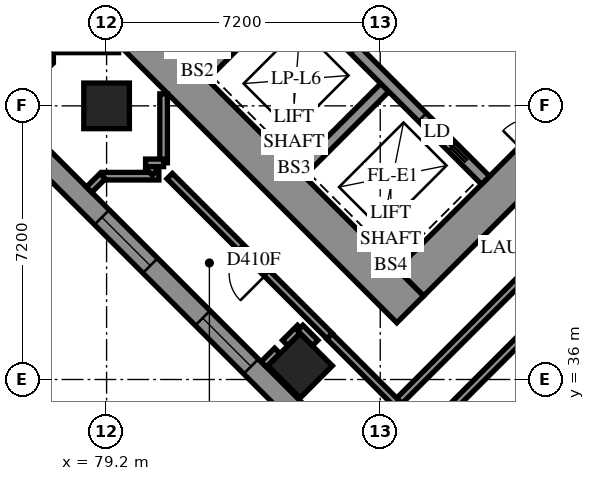
"""IFC4 building model, lengths in metres.
Left out: names, types, materials, properties, quantities, classifications, styles, units other than length and angle.
Written with IfcOpenShell. Run it as: python <this file> out.ifc"""

import sys

from ifc_helpers import new_model, si_unit, direction, frame, frame_2d, origin, origin_2d, place, context, subcontext, project, spatial, polyline, rectangle, outline, extrude, element, fill, save


model = new_model("IFC4")
c1 = context("Model", 3, precision=1e-05, world=origin(), true_north=direction((0.0, 1.0)))
c2 = subcontext(c1, "Body", "Model", "MODEL_VIEW")
j1 = project(units=[si_unit("LENGTHUNIT", "METRE"), si_unit("PLANEANGLEUNIT", "RADIAN")], contexts=[c1])
p1 = place(None, origin())
s1 = spatial("IfcSite", under=j1, at=p1, CompositionType="ELEMENT")
p2 = place(p1, origin())
s2 = spatial("IfcBuilding", under=s1, at=p2, CompositionType="ELEMENT")
p3 = place(p2, frame((0.0, 0.0, 18.6)))
s3 = spatial("IfcBuildingStorey", under=s2, at=p3, CompositionType="ELEMENT", Elevation=18.6)
for number, where, z_axis, x_axis in (
    (1, (79.2, 43.2, 0.0), (0.0, 0.0, 1.0), (1.0, 0.0, 0.0)),
    (2, (84.291, 36.362, 0.0), (0.0, 0.0, 1.0), (0.707, -0.707, 0.0)),
):
    element("IfcColumn", number, at=place(p3, frame(where, z_axis=z_axis, x_axis=x_axis)), inside=s3, PredefinedType="COLUMN", context=c2, shape_type="SweptSolid", body=[
        extrude(rectangle(XDim=1.2, YDim=1.2, at=origin_2d()), origin(), (0.0, 0.0, 1.0), 3.8),
    ])
p4 = place(p3, frame((75.594, 49.443, -0.4), z_axis=(0.0, 0.0, 1.0), x_axis=(0.7071037324, -0.70710983, 0.0)))
e3 = element("IfcWall", 3, at=p4, inside=s3, PredefinedType="SHEAR", context=c2, shape_type="SweptSolid", body=[
    extrude(rectangle(XDim=16.4, YDim=1.0, at=frame_2d((8.2, 0.0))), origin(), (0.0, 0.0, 1.0), 3.5),
])
p5 = place(p3, frame((87.19, 38.554, -0.4), z_axis=(0.0, 0.0, 1.0), x_axis=(0.707103309, 0.7071102534, 0.0)))
e4 = element("IfcWall", 4, at=p5, inside=s3, PredefinedType="SHEAR", context=c2, shape_type="SweptSolid", body=[
    extrude(rectangle(XDim=14.4, YDim=1.0, at=frame_2d((7.2, 0.0))), origin(), (0.0, 0.0, 1.0), 3.5),
])
p6 = place(p5, frame((4.55, 0.0, 0.4)))
e5 = element("IfcOpeningElement", 5, at=p6, cuts=e4, PredefinedType="OPENING", context=c2, shape_type="SweptSolid", body=[
    extrude(rectangle(XDim=1.1, YDim=2.1, at=frame_2d((0.55, 1.05))), frame((0.0, 0.51, 0.0), z_axis=(0.0, -1.0, 0.0), x_axis=(1.0, 0.0, 0.0)), (0.0, 0.0, 1.0), 1.02),
])
p7 = place(p5, frame((11.35, 0.0, 0.4)))
e6 = element("IfcOpeningElement", 6, at=p7, cuts=e4, PredefinedType="OPENING", context=c2, shape_type="SweptSolid", body=[
    extrude(rectangle(XDim=1.1, YDim=2.1, at=frame_2d((0.55, 1.05))), frame((0.0, 0.51, 0.0), z_axis=(0.0, -1.0, 0.0), x_axis=(1.0, 0.0, 0.0)), (0.0, 0.0, 1.0), 1.02),
])
for number, where, z_axis, x_axis in (
    (7, (81.746, 43.999, 0.0), (0.0, 0.0, 1.0), (0.707, 0.707, 0.0)),
    (8, (84.291, 41.453, 0.0), (0.0, 0.0, 1.0), (0.707, 0.707, 0.0)),
):
    element("IfcWall", number, at=place(p3, frame(where, z_axis=z_axis, x_axis=x_axis)), inside=s3, PredefinedType="SOLIDWALL", context=c2, shape_type="SweptSolid", body=[
        extrude(rectangle(XDim=3.3, YDim=0.3, at=frame_2d((1.65, 0.0))), origin(), (0.0, 0.0, 1.0), 3.8),
    ])
p8 = place(p3, frame((78.988, 51.423, 0.0), z_axis=(0.0, 0.0, 1.0), x_axis=(0.7071067812, -0.7071067812, 0.0)))
e9 = element("IfcWall", 9, at=p8, inside=s3, PredefinedType="SOLIDWALL", context=c2, shape_type="SweptSolid", body=[
    extrude(rectangle(XDim=14.4, YDim=0.3, at=frame_2d((7.2, 0.0))), origin(), (0.0, 0.0, 1.0), 3.8),
])
p9 = place(p8, frame((1.25, 0.0, 0.0)))
e10 = element("IfcOpeningElement", 10, at=p9, cuts=e9, PredefinedType="OPENING", context=c2, shape_type="SweptSolid", body=[
    extrude(rectangle(XDim=1.1, YDim=2.1, at=frame_2d((0.55, 1.05))), frame((0.0, 0.16, 0.0), z_axis=(0.0, -1.0, 0.0), x_axis=(1.0, 0.0, 0.0)), (0.0, 0.0, 1.0), 0.32),
])
p10 = place(p8, frame((4.85, 0.0, 0.0)))
e11 = element("IfcOpeningElement", 11, at=p10, cuts=e9, PredefinedType="OPENING", context=c2, shape_type="SweptSolid", body=[
    extrude(rectangle(XDim=1.1, YDim=2.1, at=frame_2d((0.55, 1.05))), frame((0.0, 0.16, 0.0), z_axis=(0.0, -1.0, 0.0), x_axis=(1.0, 0.0, 0.0)), (0.0, 0.0, 1.0), 0.32),
])
p11 = place(p8, frame((8.45, 0.0, 0.0)))
e12 = element("IfcOpeningElement", 12, at=p11, cuts=e9, PredefinedType="OPENING", context=c2, shape_type="SweptSolid", body=[
    extrude(rectangle(XDim=1.1, YDim=2.1, at=frame_2d((0.55, 1.05))), frame((0.0, 0.16, 0.0), z_axis=(0.0, -1.0, 0.0), x_axis=(1.0, 0.0, 0.0)), (0.0, 0.0, 1.0), 0.32),
])
p12 = place(p8, frame((12.05, 0.0, 0.0)))
e13 = element("IfcOpeningElement", 13, at=p12, cuts=e9, PredefinedType="OPENING", context=c2, shape_type="SweptSolid", body=[
    extrude(rectangle(XDim=1.1, YDim=2.1, at=frame_2d((0.55, 1.05))), frame((0.0, 0.16, 0.0), z_axis=(0.0, -1.0, 0.0), x_axis=(1.0, 0.0, 0.0)), (0.0, 0.0, 1.0), 0.32),
])
p13 = place(p3, frame((81.534, 53.969, 0.0), z_axis=(0.0, 0.0, 1.0), x_axis=(0.707103309, -0.7071102534, 0.0)))
e14 = element("IfcWall", 14, at=p13, inside=s3, PredefinedType="SOLIDWALL", context=c2, shape_type="SweptSolid", body=[
    extrude(rectangle(XDim=14.4, YDim=0.3, at=frame_2d((7.2, 0.0))), origin(), (0.0, 0.0, 1.0), 3.8),
])
p14 = place(p13, frame((12.05, 0.0, 0.0)))
e15 = element("IfcOpeningElement", 15, at=p14, cuts=e14, PredefinedType="OPENING", context=c2, shape_type="SweptSolid", body=[
    extrude(rectangle(XDim=1.1, YDim=2.1, at=frame_2d((0.55, 1.05))), frame((0.0, 0.16, 0.0), z_axis=(0.0, -1.0, 0.0), x_axis=(1.0, 0.0, 0.0)), (0.0, 0.0, 1.0), 0.32),
])
p15 = place(p3, frame((117.843, 34.665, 0.0), z_axis=(0.0, 0.0, 1.0), x_axis=(-0.7071067812, 0.7071067812, 0.0)))
e16 = element("IfcWall", 16, at=p15, inside=s3, PredefinedType="SOLIDWALL", context=c2, shape_type="SweptSolid", body=[
    extrude(outline(polyline([(-0.275, -0.275), (54.222, -0.275), (53.994, 0.275), (0.275, 0.275), (-0.275, -0.275)])), origin(), (0.0, 0.0, 1.0), 3.8),
])
p16 = place(p15, frame((0.8, 0.0, 0.7)))
e17 = element("IfcOpeningElement", 17, at=p16, cuts=e16, PredefinedType="OPENING", context=c2, shape_type="SweptSolid", body=[
    extrude(rectangle(XDim=1.8, YDim=2.4, at=frame_2d((0.9, 1.2))), frame((0.0, 0.285, 0.0), z_axis=(0.0, -1.0, 0.0), x_axis=(1.0, 0.0, 0.0)), (0.0, 0.0, 1.0), 0.57),
])
p17 = place(p15, frame((4.225, 0.0, 0.7)))
e18 = element("IfcOpeningElement", 18, at=p17, cuts=e16, PredefinedType="OPENING", context=c2, shape_type="SweptSolid", body=[
    extrude(rectangle(XDim=1.8, YDim=2.4, at=frame_2d((0.9, 1.2))), frame((0.0, 0.285, 0.0), z_axis=(0.0, -1.0, 0.0), x_axis=(1.0, 0.0, 0.0)), (0.0, 0.0, 1.0), 0.57),
])
p18 = place(p15, frame((7.825, 0.0, 0.7)))
e19 = element("IfcOpeningElement", 19, at=p18, cuts=e16, PredefinedType="OPENING", context=c2, shape_type="SweptSolid", body=[
    extrude(rectangle(XDim=1.8, YDim=2.4, at=frame_2d((0.9, 1.2))), frame((0.0, 0.285, 0.0), z_axis=(0.0, -1.0, 0.0), x_axis=(1.0, 0.0, 0.0)), (0.0, 0.0, 1.0), 0.57),
])
p19 = place(p15, frame((11.425, 0.0, 0.7)))
e20 = element("IfcOpeningElement", 20, at=p19, cuts=e16, PredefinedType="OPENING", context=c2, shape_type="SweptSolid", body=[
    extrude(rectangle(XDim=1.8, YDim=2.4, at=frame_2d((0.9, 1.2))), frame((0.0, 0.285, 0.0), z_axis=(0.0, -1.0, 0.0), x_axis=(1.0, 0.0, 0.0)), (0.0, 0.0, 1.0), 0.57),
])
p20 = place(p15, frame((15.025, 0.0, 0.7)))
e21 = element("IfcOpeningElement", 21, at=p20, cuts=e16, PredefinedType="OPENING", context=c2, shape_type="SweptSolid", body=[
    extrude(rectangle(XDim=1.8, YDim=2.4, at=frame_2d((0.9, 1.2))), frame((0.0, 0.285, 0.0), z_axis=(0.0, -1.0, 0.0), x_axis=(1.0, 0.0, 0.0)), (0.0, 0.0, 1.0), 0.57),
])
p21 = place(p15, frame((18.625, 0.0, 0.7)))
e22 = element("IfcOpeningElement", 22, at=p21, cuts=e16, PredefinedType="OPENING", context=c2, shape_type="SweptSolid", body=[
    extrude(rectangle(XDim=1.8, YDim=2.4, at=frame_2d((0.9, 1.2))), frame((0.0, 0.285, 0.0), z_axis=(0.0, -1.0, 0.0), x_axis=(1.0, 0.0, 0.0)), (0.0, 0.0, 1.0), 0.57),
])
p22 = place(p15, frame((22.225, 0.0, 0.7)))
e23 = element("IfcOpeningElement", 23, at=p22, cuts=e16, PredefinedType="OPENING", context=c2, shape_type="SweptSolid", body=[
    extrude(rectangle(XDim=1.8, YDim=2.4, at=frame_2d((0.9, 1.2))), frame((0.0, 0.285, 0.0), z_axis=(0.0, -1.0, 0.0), x_axis=(1.0, 0.0, 0.0)), (0.0, 0.0, 1.0), 0.57),
])
p23 = place(p15, frame((25.825, 0.0, 0.7)))
e24 = element("IfcOpeningElement", 24, at=p23, cuts=e16, PredefinedType="OPENING", context=c2, shape_type="SweptSolid", body=[
    extrude(rectangle(XDim=1.8, YDim=2.4, at=frame_2d((0.9, 1.2))), frame((0.0, 0.285, 0.0), z_axis=(0.0, -1.0, 0.0), x_axis=(1.0, 0.0, 0.0)), (0.0, 0.0, 1.0), 0.57),
])
p24 = place(p15, frame((29.425, 0.0, 0.7)))
e25 = element("IfcOpeningElement", 25, at=p24, cuts=e16, PredefinedType="OPENING", context=c2, shape_type="SweptSolid", body=[
    extrude(rectangle(XDim=1.8, YDim=2.4, at=frame_2d((0.9, 1.2))), frame((0.0, 0.285, 0.0), z_axis=(0.0, -1.0, 0.0), x_axis=(1.0, 0.0, 0.0)), (0.0, 0.0, 1.0), 0.57),
])
p25 = place(p15, frame((33.025, 0.0, 0.7)))
e26 = element("IfcOpeningElement", 26, at=p25, cuts=e16, PredefinedType="OPENING", context=c2, shape_type="SweptSolid", body=[
    extrude(rectangle(XDim=1.8, YDim=2.4, at=frame_2d((0.9, 1.2))), frame((0.0, 0.285, 0.0), z_axis=(0.0, -1.0, 0.0), x_axis=(1.0, 0.0, 0.0)), (0.0, 0.0, 1.0), 0.57),
])
p26 = place(p15, frame((36.625, 0.0, 0.7)))
e27 = element("IfcOpeningElement", 27, at=p26, cuts=e16, PredefinedType="OPENING", context=c2, shape_type="SweptSolid", body=[
    extrude(rectangle(XDim=1.8, YDim=2.4, at=frame_2d((0.9, 1.2))), frame((0.0, 0.285, 0.0), z_axis=(0.0, -1.0, 0.0), x_axis=(1.0, 0.0, 0.0)), (0.0, 0.0, 1.0), 0.57),
])
p27 = place(p15, frame((40.225, 0.0, 0.7)))
e28 = element("IfcOpeningElement", 28, at=p27, cuts=e16, PredefinedType="OPENING", context=c2, shape_type="SweptSolid", body=[
    extrude(rectangle(XDim=1.8, YDim=2.4, at=frame_2d((0.9, 1.2))), frame((0.0, 0.285, 0.0), z_axis=(0.0, -1.0, 0.0), x_axis=(1.0, 0.0, 0.0)), (0.0, 0.0, 1.0), 0.57),
])
p28 = place(p15, frame((43.825, 0.0, 0.7)))
e29 = element("IfcOpeningElement", 29, at=p28, cuts=e16, PredefinedType="OPENING", context=c2, shape_type="SweptSolid", body=[
    extrude(rectangle(XDim=1.8, YDim=2.4, at=frame_2d((0.9, 1.2))), frame((0.0, 0.285, 0.0), z_axis=(0.0, -1.0, 0.0), x_axis=(1.0, 0.0, 0.0)), (0.0, 0.0, 1.0), 0.57),
])
p29 = place(p15, frame((47.425, 0.0, 0.7)))
e30 = element("IfcOpeningElement", 30, at=p29, cuts=e16, PredefinedType="OPENING", context=c2, shape_type="SweptSolid", body=[
    extrude(rectangle(XDim=1.8, YDim=2.4, at=frame_2d((0.9, 1.2))), frame((0.0, 0.285, 0.0), z_axis=(0.0, -1.0, 0.0), x_axis=(1.0, 0.0, 0.0)), (0.0, 0.0, 1.0), 0.57),
])
p30 = place(p15, frame((51.06, 0.0, 0.7)))
e31 = element("IfcOpeningElement", 31, at=p30, cuts=e16, PredefinedType="OPENING", context=c2, shape_type="SweptSolid", body=[
    extrude(rectangle(XDim=1.8, YDim=2.4, at=frame_2d((0.9, 1.2))), frame((0.0, 0.285, 0.0), z_axis=(0.0, -1.0, 0.0), x_axis=(1.0, 0.0, 0.0)), (0.0, 0.0, 1.0), 0.57),
])
p31 = place(p3, frame((77.07, 42.275, 0.0), z_axis=(0.0, 0.0, 1.0), x_axis=(0.7071067812, -0.7071067812, 0.0)))
e32 = element("IfcWall", 32, at=p31, inside=s3, PredefinedType="SOLIDWALL", context=c2, shape_type="SweptSolid", body=[
    extrude(outline(polyline([(0.114, -0.275), (39.288, -0.275), (38.737, 0.275), (-0.114, 0.275), (0.114, -0.275)])), origin(), (0.0, 0.0, 1.0), 3.8),
])
p32 = place(p31, frame((2.837, 0.0, 0.7)))
e33 = element("IfcOpeningElement", 33, at=p32, cuts=e32, PredefinedType="OPENING", context=c2, shape_type="SweptSolid", body=[
    extrude(rectangle(XDim=1.8, YDim=2.4, at=frame_2d((0.9, 1.2))), frame((0.0, 0.285, 0.0), z_axis=(0.0, -1.0, 0.0), x_axis=(1.0, 0.0, 0.0)), (0.0, 0.0, 1.0), 0.57),
])
p33 = place(p31, frame((6.588, 0.0, 0.7)))
e34 = element("IfcOpeningElement", 34, at=p33, cuts=e32, PredefinedType="OPENING", context=c2, shape_type="SweptSolid", body=[
    extrude(rectangle(XDim=1.8, YDim=2.4, at=frame_2d((0.9, 1.2))), frame((0.0, 0.285, 0.0), z_axis=(0.0, -1.0, 0.0), x_axis=(1.0, 0.0, 0.0)), (0.0, 0.0, 1.0), 0.57),
])
p34 = place(p31, frame((10.188, 0.0, 0.7)))
e35 = element("IfcOpeningElement", 35, at=p34, cuts=e32, PredefinedType="OPENING", context=c2, shape_type="SweptSolid", body=[
    extrude(rectangle(XDim=1.8, YDim=2.4, at=frame_2d((0.9, 1.2))), frame((0.0, 0.285, 0.0), z_axis=(0.0, -1.0, 0.0), x_axis=(1.0, 0.0, 0.0)), (0.0, 0.0, 1.0), 0.57),
])
p35 = place(p31, frame((13.787, 0.0, 0.7)))
e36 = element("IfcOpeningElement", 36, at=p35, cuts=e32, PredefinedType="OPENING", context=c2, shape_type="SweptSolid", body=[
    extrude(rectangle(XDim=1.8, YDim=2.4, at=frame_2d((0.9, 1.2))), frame((0.0, 0.285, 0.0), z_axis=(0.0, -1.0, 0.0), x_axis=(1.0, 0.0, 0.0)), (0.0, 0.0, 1.0), 0.57),
])
p36 = place(p31, frame((17.387, 0.0, 0.7)))
e37 = element("IfcOpeningElement", 37, at=p36, cuts=e32, PredefinedType="OPENING", context=c2, shape_type="SweptSolid", body=[
    extrude(rectangle(XDim=1.8, YDim=2.4, at=frame_2d((0.9, 1.2))), frame((0.0, 0.285, 0.0), z_axis=(0.0, -1.0, 0.0), x_axis=(1.0, 0.0, 0.0)), (0.0, 0.0, 1.0), 0.57),
])
p37 = place(p31, frame((20.988, 0.0, 0.7)))
e38 = element("IfcOpeningElement", 38, at=p37, cuts=e32, PredefinedType="OPENING", context=c2, shape_type="SweptSolid", body=[
    extrude(rectangle(XDim=1.8, YDim=2.4, at=frame_2d((0.9, 1.2))), frame((0.0, 0.285, 0.0), z_axis=(0.0, -1.0, 0.0), x_axis=(1.0, 0.0, 0.0)), (0.0, 0.0, 1.0), 0.57),
])
p38 = place(p31, frame((24.587, 0.0, 0.7)))
e39 = element("IfcOpeningElement", 39, at=p38, cuts=e32, PredefinedType="OPENING", context=c2, shape_type="SweptSolid", body=[
    extrude(rectangle(XDim=1.8, YDim=2.4, at=frame_2d((0.9, 1.2))), frame((0.0, 0.285, 0.0), z_axis=(0.0, -1.0, 0.0), x_axis=(1.0, 0.0, 0.0)), (0.0, 0.0, 1.0), 0.57),
])
p39 = place(p31, frame((28.188, 0.0, 0.7)))
e40 = element("IfcOpeningElement", 40, at=p39, cuts=e32, PredefinedType="OPENING", context=c2, shape_type="SweptSolid", body=[
    extrude(rectangle(XDim=1.8, YDim=2.4, at=frame_2d((0.9, 1.2))), frame((0.0, 0.285, 0.0), z_axis=(0.0, -1.0, 0.0), x_axis=(1.0, 0.0, 0.0)), (0.0, 0.0, 1.0), 0.57),
])
p40 = place(p31, frame((31.788, 0.0, 0.7)))
e41 = element("IfcOpeningElement", 41, at=p40, cuts=e32, PredefinedType="OPENING", context=c2, shape_type="SweptSolid", body=[
    extrude(rectangle(XDim=1.8, YDim=2.4, at=frame_2d((0.9, 1.2))), frame((0.0, 0.285, 0.0), z_axis=(0.0, -1.0, 0.0), x_axis=(1.0, 0.0, 0.0)), (0.0, 0.0, 1.0), 0.57),
])
p41 = place(p31, frame((35.388, 0.0, 0.7)))
e42 = element("IfcOpeningElement", 42, at=p41, cuts=e32, PredefinedType="OPENING", context=c2, shape_type="SweptSolid", body=[
    extrude(rectangle(XDim=1.8, YDim=2.4, at=frame_2d((0.9, 1.2))), frame((0.0, 0.285, 0.0), z_axis=(0.0, -1.0, 0.0), x_axis=(1.0, 0.0, 0.0)), (0.0, 0.0, 1.0), 0.57),
])
p42 = place(p3, frame((86.376, 33.357, 0.0), z_axis=(0.0, 0.0, 1.0), x_axis=(0.7071021083, 0.707111454, 0.0)))
e43 = element("IfcWall", 43, at=p42, inside=s3, PredefinedType="PARTITIONING", context=c2, shape_type="SweptSolid", body=[
    extrude(rectangle(XDim=10.7, YDim=0.2, at=frame_2d((5.35, 0.0))), origin(), (0.0, 0.0, 1.0), 3.8),
])
p43 = place(p3, frame((86.836, 35.372, 0.0), z_axis=(0.0, 0.0, 1.0), x_axis=(0.7071067812, 0.7071067812, 0.0)))
e44 = element("IfcWall", 44, at=p43, inside=s3, PredefinedType="PARTITIONING", context=c2, shape_type="SweptSolid", body=[
    extrude(rectangle(XDim=8.949, YDim=0.2, at=frame_2d((4.474, 0.0))), origin(), (0.0, 0.0, 1.0), 3.8),
])
p44 = place(p43, frame((7.8, 0.0, 0.0)))
e45 = element("IfcOpeningElement", 45, at=p44, cuts=e44, PredefinedType="OPENING", context=c2, shape_type="SweptSolid", body=[
    extrude(rectangle(XDim=1.0, YDim=2.1, at=frame_2d((0.5, 1.05))), frame((0.0, 0.11, 0.0), z_axis=(0.0, -1.0, 0.0), x_axis=(1.0, 0.0, 0.0)), (0.0, 0.0, 1.0), 0.22),
])
p45 = place(p3, frame((85.07, 37.142, 0.0), z_axis=(0.0, 0.0, 1.0), x_axis=(-0.7070899851, 0.7071235769, 0.0)))
e46 = element("IfcWall", 46, at=p45, inside=s3, PredefinedType="PARTITIONING", context=c2, shape_type="SweptSolid", body=[
    extrude(rectangle(XDim=5.954, YDim=0.2, at=frame_2d((2.977, 0.0))), origin(), (0.0, 0.0, 1.0), 3.8),
])
p46 = place(p45, frame((2.326, 0.0, 0.0)))
e47 = element("IfcOpeningElement", 47, at=p46, cuts=e46, PredefinedType="OPENING", context=c2, shape_type="SweptSolid", body=[
    extrude(rectangle(XDim=1.0, YDim=2.1, at=frame_2d((0.5, 1.05))), frame((0.0, 0.11, 0.0), z_axis=(0.0, -1.0, 0.0), x_axis=(1.0, 0.0, 0.0)), (0.0, 0.0, 1.0), 0.22),
])
p47 = place(p3, frame((85.065, 37.137, 0.0), z_axis=(0.0, 0.0, 1.0), x_axis=(0.7071067812, -0.7071067812, 0.0)))
e48 = element("IfcWall", 48, at=p47, inside=s3, PredefinedType="PARTITIONING", context=c2, shape_type="SweptSolid", body=[
    extrude(rectangle(XDim=2.5, YDim=0.2, at=frame_2d((1.25, 0.0))), origin(), (0.0, 0.0, 1.0), 3.8),
])
for number, where, z_axis, x_axis in (
    (49, (77.702, 44.7, 0.0), (0.0, 0.0, 1.0), (1.0, 0.0, 0.0)),
    (50, (80.7, 41.702, 0.0), (0.0, 0.0, 1.0), (0.0, 1.0, 0.0)),
):
    element("IfcWall", number, at=place(p3, frame(where, z_axis=z_axis, x_axis=x_axis)), inside=s3, PredefinedType="PARTITIONING", context=c2, shape_type="SweptSolid", body=[
        extrude(rectangle(XDim=1.814, YDim=0.2, at=frame_2d((0.907, 0.0))), origin(), (0.0, 0.0, 1.0), 3.8),
    ])
p48 = place(p3, frame((79.098, 41.35, 0.0), z_axis=(0.0, 0.0, 1.0), x_axis=(1.0, 0.0, 0.0)))
e51 = element("IfcWall", 51, at=p48, inside=s3, PredefinedType="PARTITIONING", context=c2, shape_type="SweptSolid", body=[
    extrude(rectangle(XDim=1.478, YDim=0.2, at=frame_2d((0.739, 0.0))), origin(), (0.0, 0.0, 1.0), 3.8),
])
for number, where, z_axis, x_axis in (
    (52, (83.9, 36.962, 0.0), (0.0, 0.0, 1.0), (0.707, 0.707, 0.0)),
    (53, (84.294, 37.356, 0.0), (0.0, 0.0, 1.0), (0.707, -0.707, 0.0)),
):
    element("IfcWall", number, at=place(p3, frame(where, z_axis=z_axis, x_axis=x_axis)), inside=s3, PredefinedType="PARTITIONING", context=c2, shape_type="SweptSolid", body=[
        extrude(rectangle(XDim=0.557, YDim=0.2, at=frame_2d((0.279, 0.0))), origin(), (0.0, 0.0, 1.0), 3.8),
    ])
p49 = place(p3, frame((80.315, 41.605, 0.0), z_axis=(0.0, 0.0, 1.0), x_axis=(0.7071067812, -0.7071067812, 0.0)))
e54 = element("IfcWall", 54, at=p49, inside=s3, PredefinedType="PARTITIONING", context=c2, shape_type="SweptSolid", body=[
    extrude(rectangle(XDim=0.225, YDim=0.2, at=frame_2d((0.113, 0.0))), origin(), (0.0, 0.0, 1.0), 3.8),
])
p50 = place(p3, frame((77.7, 44.356, 0.0), z_axis=(0.0, 0.0, 1.0), x_axis=(0.0, 1.0, 0.0)))
e55 = element("IfcWall", 55, at=p50, inside=s3, PredefinedType="PARTITIONING", context=c2, shape_type="SweptSolid", body=[
    extrude(rectangle(XDim=0.344, YDim=0.2, at=frame_2d((0.172, 0.0))), origin(), (0.0, 0.0, 1.0), 3.8),
])
p51 = place(p3, frame((80.226, 41.7, 0.0), z_axis=(0.0, 0.0, 1.0), x_axis=(1.0, 0.0, 0.0)))
e56 = element("IfcWall", 56, at=p51, inside=s3, PredefinedType="PARTITIONING", context=c2, shape_type="SweptSolid", body=[
    extrude(rectangle(XDim=0.474, YDim=0.2, at=frame_2d((0.237, 0.0))), origin(), (0.0, 0.0, 1.0), 3.8),
])
for number, where, z_axis, x_axis in (
    (57, (78.74, 40.994, 0.0), (0.0, 0.0, 1.0), (0.707, 0.707, 0.0)),
    (58, (83.336, 36.398, 0.0), (0.0, 0.0, 1.0), (0.707, 0.707, 0.0)),
):
    element("IfcWall", number, at=place(p3, frame(where, z_axis=z_axis, x_axis=x_axis)), inside=s3, PredefinedType="PARTITIONING", context=c2, shape_type="SweptSolid", body=[
        extrude(rectangle(XDim=0.504, YDim=0.2, at=frame_2d((0.252, 0.0))), origin(), (0.0, 0.0, 1.0), 3.8),
    ])
p52 = place(p32, origin())
e59 = element("IfcWindow", 59, at=p52, inside=s3, PartitioningType="SINGLE_PANEL", PredefinedType="WINDOW", context=c2, shape_type="SweptSolid", body=[
    extrude(rectangle(XDim=1.8, YDim=2.4, at=frame_2d((0.9, 1.2))), frame((0.0, 0.155, 0.0), z_axis=(0.0, -1.0, 0.0), x_axis=(1.0, 0.0, 0.0)), (0.0, 0.0, 1.0), 0.06),
])
fill(e33, e59)
p53 = place(p33, origin())
e60 = element("IfcWindow", 60, at=p53, inside=s3, PartitioningType="SINGLE_PANEL", PredefinedType="WINDOW", context=c2, shape_type="SweptSolid", body=[
    extrude(rectangle(XDim=1.8, YDim=2.4, at=frame_2d((0.9, 1.2))), frame((0.0, 0.155, 0.0), z_axis=(0.0, -1.0, 0.0), x_axis=(1.0, 0.0, 0.0)), (0.0, 0.0, 1.0), 0.06),
])
fill(e34, e60)
p54 = place(p12, origin())
e61 = element("IfcDoor", 61, at=p54, inside=s3, OperationType="SLIDING_TO_RIGHT", PredefinedType="DOOR", context=c2, shape_type="SweptSolid", body=[
    extrude(rectangle(XDim=1.1, YDim=2.1, at=frame_2d((0.55, 1.05))), frame((0.0, 0.025, 0.0), z_axis=(0.0, -1.0, 0.0), x_axis=(1.0, 0.0, 0.0)), (0.0, 0.0, 1.0), 0.05),
])
fill(e13, e61)
p55 = place(p46, origin())
e62 = element("IfcDoor", 62, at=p55, inside=s3, OperationType="SINGLE_SWING_RIGHT", PredefinedType="DOOR", context=c2, shape_type="SweptSolid", body=[
    extrude(rectangle(XDim=1.0, YDim=2.1, at=frame_2d((0.5, 1.05))), frame((0.0, 0.025, 0.0), z_axis=(0.0, -1.0, 0.0), x_axis=(1.0, 0.0, 0.0)), (0.0, 0.0, 1.0), 0.05),
])
fill(e47, e62)
save(model, sys.argv[1])
